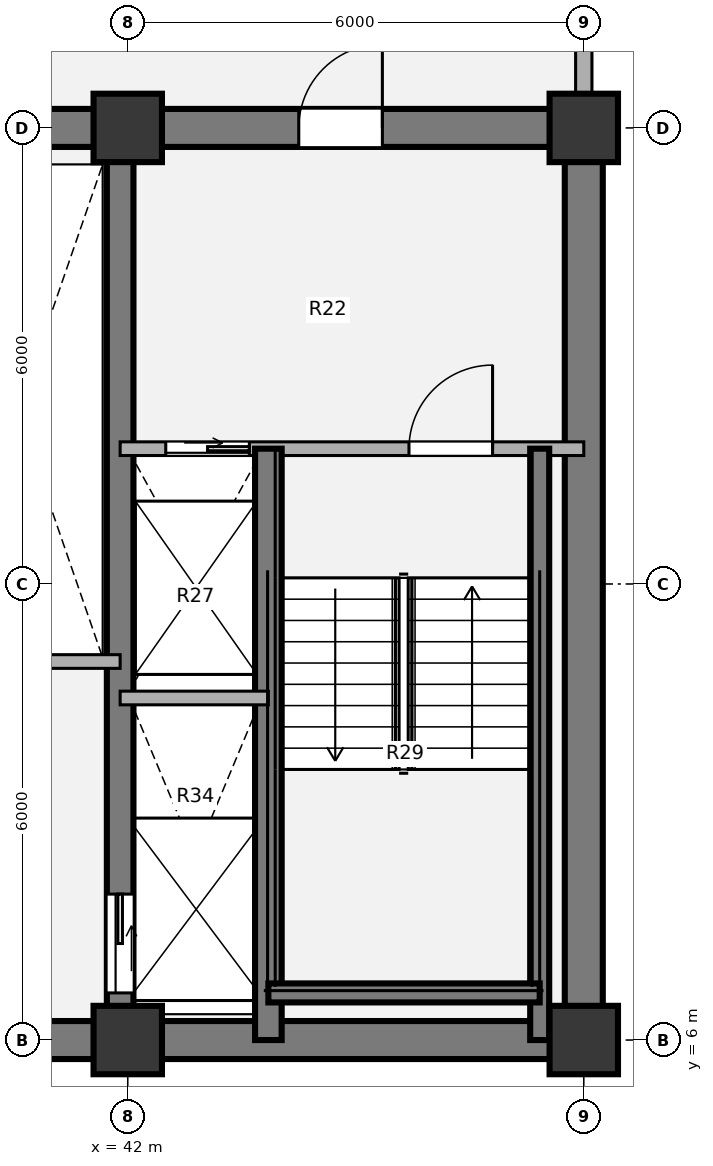
"""IFC4 building model, lengths in metres.
Left out: names, types, materials, properties, quantities, classifications, styles, units other than length and angle.
Written with IfcOpenShell. Run it as: python <this file> out.ifc"""

import sys

from ifc_helpers import new_model, si_unit, direction, frame, frame_2d, origin, origin_2d, place, context, subcontext, project, spatial, rectangle, extrude, source, transform, mapped, element, fill, save


model = new_model("IFC4")
c1 = context("Model", 3, precision=1e-05, world=origin(), true_north=direction((0.0, 1.0)))
c2 = subcontext(c1, "Body", "Model", "MODEL_VIEW")
j1 = project(units=[si_unit("LENGTHUNIT", "METRE"), si_unit("PLANEANGLEUNIT", "RADIAN")], contexts=[c1])
p1 = place(None, origin())
s1 = spatial("IfcSite", under=j1, at=p1, CompositionType="ELEMENT")
p2 = place(p1, origin())
s2 = spatial("IfcBuilding", under=s1, at=p2, CompositionType="ELEMENT")
p3 = place(p2, frame((0.0, 0.0, 101.16)))
s3 = spatial("IfcBuildingStorey", under=s2, at=p3, CompositionType="ELEMENT", Elevation=101.16)
m1 = source(origin(), c2, "Body", "SweptSolid", [
    extrude(rectangle(XDim=0.9, YDim=0.9, at=origin_2d()), origin(), (0.0, 0.0, 1.0), 3.78),
])
for number, where, z_axis, x_axis in (
    (1, (42.0, 6.0, 0.0), (0.0, 0.0, 1.0), (1.0, 0.0, 0.0)),
    (2, (48.0, 6.0, 0.0), (0.0, 0.0, 1.0), (1.0, 0.0, 0.0)),
    (3, (42.0, 18.0, 0.0), (0.0, 0.0, 1.0), (1.0, 0.0, 0.0)),
    (4, (48.0, 18.0, 0.0), (0.0, 0.0, 1.0), (1.0, 0.0, 0.0)),
):
    element("IfcColumn", number, at=place(p3, frame(where, z_axis=z_axis, x_axis=x_axis)), inside=s3, PredefinedType="COLUMN", context=c2, shape_type="MappedRepresentation", body=[
        mapped(m1, transform((0.0, 0.0, 0.0), x_axis=(1.0, 0.0, 0.0), y_axis=(0.0, 1.0, 0.0), z_axis=(0.0, 0.0, 1.0), scale=1.0)),
    ])
p4 = place(p3, frame((48.25, 6.0, 0.0), z_axis=(0.0, 0.0, 1.0), x_axis=(-1.0, 0.0, 0.0)))
e5 = element("IfcWall", 5, at=p4, inside=s3, PredefinedType="SHEAR", context=c2, shape_type="SweptSolid", body=[
    extrude(rectangle(XDim=24.5, YDim=0.5, at=frame_2d((12.25, 0.0))), origin(), (0.0, 0.0, 1.0), 3.78),
])
p5 = place(p3, frame((48.0, 18.0, 0.0), z_axis=(0.0, 0.0, 1.0), x_axis=(0.0, -1.0, 0.0)))
e6 = element("IfcWall", 6, at=p5, inside=s3, PredefinedType="SHEAR", context=c2, shape_type="SweptSolid", body=[
    extrude(rectangle(XDim=12.0, YDim=0.5, at=frame_2d((6.0, 0.0))), origin(), (0.0, 0.0, 1.0), 3.78),
])
p6 = place(p3, frame((38.8, 18.0, 0.0), z_axis=(0.0, 0.0, 1.0), x_axis=(1.0, 0.0, 0.0)))
e7 = element("IfcWall", 7, at=p6, inside=s3, PredefinedType="SHEAR", context=c2, shape_type="SweptSolid", body=[
    extrude(rectangle(XDim=9.45, YDim=0.5, at=frame_2d((4.725, 0.0))), origin(), (0.0, 0.0, 1.0), 3.78),
])
p7 = place(p6, frame((5.45, 0.0, 0.0)))
e8 = element("IfcOpeningElement", 8, at=p7, cuts=e7, PredefinedType="OPENING", context=c2, shape_type="SweptSolid", body=[
    extrude(rectangle(XDim=1.1, YDim=2.1, at=origin_2d()), frame((0.55, 0.26, 1.05), z_axis=(0.0, -1.0, 0.0), x_axis=(1.0, 0.0, 0.0)), (0.0, 0.0, 1.0), 0.52),
])
p8 = place(p3, frame((41.9, 18.0, 0.0), z_axis=(0.0, 0.0, 1.0), x_axis=(0.0, -1.0, 0.0)))
e9 = element("IfcWall", 9, at=p8, inside=s3, PredefinedType="SHEAR", context=c2, shape_type="SweptSolid", body=[
    extrude(rectangle(XDim=12.0, YDim=0.35, at=frame_2d((6.0, 0.0))), origin(), (0.0, 0.0, 1.0), 3.78),
])
p9 = place(p8, frame((10.08, 0.0, 0.0)))
e10 = element("IfcOpeningElement", 10, at=p9, cuts=e9, PredefinedType="OPENING", context=c2, shape_type="SweptSolid", body=[
    extrude(rectangle(XDim=1.3, YDim=2.1, at=origin_2d()), frame((0.65, 0.185, 1.05), z_axis=(0.0, -1.0, 0.0), x_axis=(1.0, 0.0, 0.0)), (0.0, 0.0, 1.0), 0.37),
])
p10 = place(p3, frame((48.0, 21.05, 0.0), z_axis=(0.0, 0.0, 1.0), x_axis=(0.0, -1.0, 0.0)))
e11 = element("IfcWall", 11, at=p10, inside=s3, PredefinedType="SOLIDWALL", context=c2, shape_type="SweptSolid", body=[
    extrude(rectangle(XDim=2.62, YDim=0.215, at=frame_2d((1.31, 0.0))), origin(), (0.0, 0.0, 1.0), 3.53),
])
p11 = place(p3, frame((39.35, 10.98, 0.0), z_axis=(0.0, 0.0, 1.0), x_axis=(1.0, 0.0, 0.0)))
e12 = element("IfcWall", 12, at=p11, inside=s3, PredefinedType="PARTITIONING", context=c2, shape_type="SweptSolid", body=[
    extrude(rectangle(XDim=2.55, YDim=0.18, at=frame_2d((1.275, 0.0))), origin(), (0.0, 0.0, 1.0), 3.5),
])
p12 = place(p3, frame((41.9, 13.78, 0.0), z_axis=(0.0, 0.0, 1.0), x_axis=(1.0, 0.0, 0.0)))
e13 = element("IfcWall", 13, at=p12, inside=s3, PredefinedType="PARTITIONING", context=c2, shape_type="SweptSolid", body=[
    extrude(rectangle(XDim=6.1, YDim=0.18, at=frame_2d((3.05, 0.0))), origin(), (0.0, 0.0, 1.0), 3.5),
])
p13 = place(p12, frame((0.6, 0.0, 0.0)))
e14 = element("IfcOpeningElement", 14, at=p13, cuts=e13, PredefinedType="OPENING", context=c2, shape_type="SweptSolid", body=[
    extrude(rectangle(XDim=1.1, YDim=2.1, at=origin_2d()), frame((0.55, 0.1, 1.05), z_axis=(0.0, -1.0, 0.0), x_axis=(1.0, 0.0, 0.0)), (0.0, 0.0, 1.0), 0.2),
])
p14 = place(p12, frame((3.8, 0.0, 0.0)))
e15 = element("IfcOpeningElement", 15, at=p14, cuts=e13, PredefinedType="OPENING", context=c2, shape_type="SweptSolid", body=[
    extrude(rectangle(XDim=1.1, YDim=2.1, at=origin_2d()), frame((0.55, 0.1, 1.05), z_axis=(0.0, -1.0, 0.0), x_axis=(1.0, 0.0, 0.0)), (0.0, 0.0, 1.0), 0.2),
])
p15 = place(p3, frame((43.85, 6.0, 0.0), z_axis=(0.0, 0.0, 1.0), x_axis=(0.0, 1.0, 0.0)))
e16 = element("IfcWall", 16, at=p15, inside=s3, PredefinedType="SHEAR", context=c2, shape_type="SweptSolid", body=[
    extrude(rectangle(XDim=7.78, YDim=0.35, at=frame_2d((3.89, 0.0))), origin(), (0.0, 0.0, 1.0), 3.85),
])
p16 = place(p3, frame((47.42, 6.0, 0.0), z_axis=(0.0, 0.0, 1.0), x_axis=(0.0, 1.0, 0.0)))
e17 = element("IfcWall", 17, at=p16, inside=s3, PredefinedType="SHEAR", context=c2, shape_type="SweptSolid", body=[
    extrude(rectangle(XDim=7.78, YDim=0.25, at=frame_2d((3.89, 0.0))), origin(), (0.0, 0.0, 1.0), 3.85),
])
p17 = place(p3, frame((43.85, 6.62, 0.0), z_axis=(0.0, 0.0, 1.0), x_axis=(1.0, 0.0, 0.0)))
e18 = element("IfcWall", 18, at=p17, inside=s3, PredefinedType="SHEAR", context=c2, shape_type="SweptSolid", body=[
    extrude(rectangle(XDim=3.57, YDim=0.25, at=frame_2d((1.785, 0.0))), origin(), (0.0, 0.0, 1.0), 3.85),
])
p18 = place(p3, frame((41.9, 10.5, 0.0), z_axis=(0.0, 0.0, 1.0), x_axis=(1.0, 0.0, 0.0)))
e19 = element("IfcWall", 19, at=p18, inside=s3, PredefinedType="PARTITIONING", context=c2, shape_type="SweptSolid", body=[
    extrude(rectangle(XDim=1.95, YDim=0.18, at=frame_2d((0.975, 0.0))), origin(), (0.0, 0.0, 1.0), 3.5),
])
m2 = source(origin(), c2, "Body", "SweptSolid", [
    extrude(rectangle(XDim=1.1, YDim=2.1, at=origin_2d()), frame((0.55, 0.025, 1.05), z_axis=(0.0, -1.0, 0.0), x_axis=(1.0, 0.0, 0.0)), (0.0, 0.0, 1.0), 0.05),
])
p19 = place(p13, origin())
e20 = element("IfcDoor", 20, at=p19, inside=s3, OperationType="SLIDING_TO_RIGHT", PredefinedType="DOOR", context=c2, shape_type="MappedRepresentation", body=[
    mapped(m2, transform((0.0, 0.0, 0.0), x_axis=(1.0, 0.0, 0.0), y_axis=(0.0, 1.0, 0.0), z_axis=(0.0, 0.0, 1.0), scale=1.0)),
])
fill(e14, e20)
m3 = source(origin(), c2, "Body", "SweptSolid", [
    extrude(rectangle(XDim=1.1, YDim=2.1, at=origin_2d()), frame((0.55, 0.025, 1.05), z_axis=(0.0, -1.0, 0.0), x_axis=(1.0, 0.0, 0.0)), (0.0, 0.0, 1.0), 0.05),
])
p20 = place(p14, origin())
e21 = element("IfcDoor", 21, at=p20, inside=s3, OperationType="SINGLE_SWING_RIGHT", PredefinedType="DOOR", context=c2, shape_type="MappedRepresentation", body=[
    mapped(m3, transform((0.0, 0.0, 0.0), x_axis=(1.0, 0.0, 0.0), y_axis=(0.0, 1.0, 0.0), z_axis=(0.0, 0.0, 1.0), scale=1.0)),
])
fill(e15, e21)
m4 = source(origin(), c2, "Body", "SweptSolid", [
    extrude(rectangle(XDim=1.3, YDim=2.1, at=origin_2d()), frame((0.65, 0.025, 1.05), z_axis=(0.0, -1.0, 0.0), x_axis=(1.0, 0.0, 0.0)), (0.0, 0.0, 1.0), 0.05),
])
p21 = place(p9, origin())
e22 = element("IfcDoor", 22, at=p21, inside=s3, OperationType="SLIDING_TO_LEFT", PredefinedType="DOOR", context=c2, shape_type="MappedRepresentation", body=[
    mapped(m4, transform((0.0, 0.0, 0.0), x_axis=(1.0, 0.0, 0.0), y_axis=(0.0, 1.0, 0.0), z_axis=(0.0, 0.0, 1.0), scale=1.0)),
])
fill(e10, e22)
m5 = source(origin(), c2, "Body", "SweptSolid", [
    extrude(rectangle(XDim=1.1, YDim=2.1, at=origin_2d()), frame((0.55, 0.025, 1.05), z_axis=(0.0, -1.0, 0.0), x_axis=(1.0, 0.0, 0.0)), (0.0, 0.0, 1.0), 0.05),
])
p22 = place(p7, origin())
e23 = element("IfcDoor", 23, at=p22, inside=s3, OperationType="SINGLE_SWING_RIGHT", PredefinedType="DOOR", context=c2, shape_type="MappedRepresentation", body=[
    mapped(m5, transform((0.0, 0.0, 0.0), x_axis=(1.0, 0.0, 0.0), y_axis=(0.0, 1.0, 0.0), z_axis=(0.0, 0.0, 1.0), scale=1.0)),
])
fill(e8, e23)
save(model, sys.argv[1])
